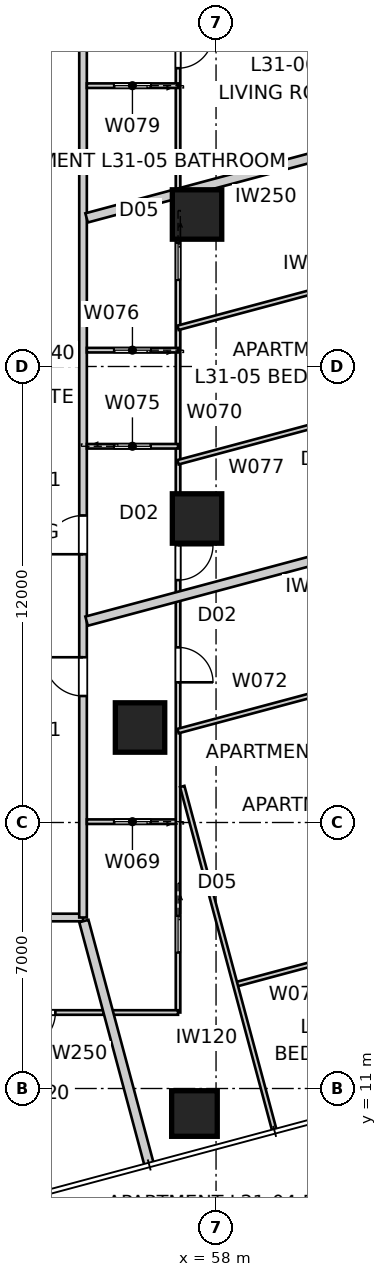
"""IFC4 building model, lengths in metres.
Left out: names, types, materials, properties, quantities, classifications, styles, units other than length and angle.
Written with IfcOpenShell. Run it as: python <this file> out.ifc"""

import sys

from ifc_helpers import new_model, si_unit, direction, frame, frame_2d, origin, origin_2d, place, context, subcontext, project, spatial, rectangle, extrude, element, fill, save


model = new_model("IFC4")
c1 = context("Model", 3, precision=1e-05, world=origin(), true_north=direction((0.0, 1.0)))
c2 = subcontext(c1, "Body", "Model", "MODEL_VIEW")
j1 = project(units=[si_unit("LENGTHUNIT", "METRE"), si_unit("PLANEANGLEUNIT", "RADIAN")], contexts=[c1])
p1 = place(None, origin())
s1 = spatial("IfcSite", under=j1, at=p1, CompositionType="ELEMENT")
p2 = place(p1, origin())
s2 = spatial("IfcBuilding", under=s1, at=p2, CompositionType="ELEMENT")
p3 = place(p2, frame((0.0, 0.0, 115.0)))
s3 = spatial("IfcBuildingStorey", under=s2, at=p3, CompositionType="ELEMENT", Elevation=115.0)
p4 = place(p3, frame((57.432, 10.342, 0.0), z_axis=(0.0, 0.0, 1.0), x_axis=(1.0, 0.0, 0.0)))
e1 = element("IfcColumn", 1, at=p4, inside=s3, PredefinedType="COLUMN", context=c2, shape_type="SweptSolid", body=[
    extrude(rectangle(XDim=1.2, YDim=1.2, at=origin_2d()), origin(), (0.0, 0.0, 1.0), 3.4),
])
for number, where, z_axis, x_axis in (
    (2, (57.5, 26.0, 0.0), (0.0, 0.0, 1.0), (1.0, 0.0, 0.0)),
    (3, (57.5, 34.0, 0.0), (0.0, 0.0, 1.0), (1.0, 0.0, 0.0)),
    (4, (56.0, 20.5, 0.0), (0.0, 0.0, 1.0), (1.0, 0.0, 0.0)),
):
    element("IfcColumn", number, at=place(p3, frame(where, z_axis=z_axis, x_axis=x_axis)), inside=s3, PredefinedType="COLUMN", context=c2, shape_type="SweptSolid", body=[
        extrude(rectangle(XDim=1.3, YDim=1.3, at=origin_2d()), origin(), (0.0, 0.0, 1.0), 3.4),
    ])
p5 = place(p3, frame((26.3, 15.5, 0.0), z_axis=(0.0, 0.0, 1.0), x_axis=(1.0, 0.0, 0.0)))
e5 = element("IfcWall", 5, at=p5, inside=s3, PredefinedType="PARTITIONING", context=c2, shape_type="SweptSolid", body=[
    extrude(rectangle(XDim=28.2, YDim=0.2, at=frame_2d((14.1, 0.0))), origin(), (0.0, 0.0, 1.0), 3.25),
])
p6 = place(p5, frame((21.474, 0.0, 0.0)))
e6 = element("IfcOpeningElement", 6, at=p6, cuts=e5, PredefinedType="OPENING", context=c2, shape_type="SweptSolid", body=[
    extrude(rectangle(XDim=1.02, YDim=2.34, at=frame_2d((0.51, 1.17))), frame((0.0, 0.11, 0.0), z_axis=(0.0, -1.0, 0.0), x_axis=(1.0, 0.0, 0.0)), (0.0, 0.0, 1.0), 0.22),
])
p7 = place(p5, frame((1.353, 0.0, 0.0)))
e7 = element("IfcOpeningElement", 7, at=p7, cuts=e5, PredefinedType="OPENING", context=c2, shape_type="SweptSolid", body=[
    extrude(rectangle(XDim=1.02, YDim=2.1, at=frame_2d((0.51, 1.05))), frame((0.0, 0.11, 0.0), z_axis=(0.0, -1.0, 0.0), x_axis=(1.0, 0.0, 0.0)), (0.0, 0.0, 1.0), 0.22),
])
p8 = place(p3, frame((54.5, 15.5, 0.0), z_axis=(0.0, 0.0, 1.0), x_axis=(0.0, 1.0, 0.0)))
e8 = element("IfcWall", 8, at=p8, inside=s3, PredefinedType="PARTITIONING", context=c2, shape_type="SweptSolid", body=[
    extrude(rectangle(XDim=29.0, YDim=0.2, at=frame_2d((14.5, 0.0))), origin(), (0.0, 0.0, 1.0), 3.25),
])
p9 = place(p8, frame((24.76, 0.0, 0.0)))
e9 = element("IfcOpeningElement", 9, at=p9, cuts=e8, PredefinedType="OPENING", context=c2, shape_type="SweptSolid", body=[
    extrude(rectangle(XDim=1.02, YDim=2.1, at=frame_2d((0.51, 1.05))), frame((0.0, 0.11, 0.0), z_axis=(0.0, -1.0, 0.0), x_axis=(1.0, 0.0, 0.0)), (0.0, 0.0, 1.0), 0.22),
])
p10 = place(p8, frame((5.829, 0.0, 0.0)))
e10 = element("IfcOpeningElement", 10, at=p10, cuts=e8, PredefinedType="OPENING", context=c2, shape_type="SweptSolid", body=[
    extrude(rectangle(XDim=1.02, YDim=2.34, at=frame_2d((0.51, 1.17))), frame((0.0, 0.11, 0.0), z_axis=(0.0, -1.0, 0.0), x_axis=(1.0, 0.0, 0.0)), (0.0, 0.0, 1.0), 0.22),
])
p11 = place(p8, frame((9.559, 0.0, 0.0)))
e11 = element("IfcOpeningElement", 11, at=p11, cuts=e8, PredefinedType="OPENING", context=c2, shape_type="SweptSolid", body=[
    extrude(rectangle(XDim=1.02, YDim=2.34, at=frame_2d((0.51, 1.17))), frame((0.0, 0.11, 0.0), z_axis=(0.0, -1.0, 0.0), x_axis=(1.0, 0.0, 0.0)), (0.0, 0.0, 1.0), 0.22),
])
p12 = place(p3, frame((56.242, 8.988, 0.0), z_axis=(0.0, 0.0, 1.0), x_axis=(-0.25880587229, 0.965929355837, 0.0)))
e12 = element("IfcWall", 12, at=p12, inside=s3, PredefinedType="PARTITIONING", context=c2, shape_type="SweptSolid", body=[
    extrude(rectangle(XDim=6.645, YDim=0.25, at=frame_2d((3.322, 0.0))), origin(), (0.0, 0.0, 1.0), 3.25),
])
p13 = place(p3, frame((63.665, 36.341, 0.0), z_axis=(0.0, 0.0, 1.0), x_axis=(-0.965927049013, -0.258814481793, 0.0)))
e13 = element("IfcWall", 13, at=p13, inside=s3, PredefinedType="PARTITIONING", context=c2, shape_type="SweptSolid", body=[
    extrude(rectangle(XDim=9.392, YDim=0.25, at=frame_2d((4.696, 0.0))), origin(), (0.0, 0.0, 1.0), 3.25),
])
p14 = place(p3, frame((66.318, 26.44, 0.0), z_axis=(0.0, 0.0, 1.0), x_axis=(-0.965924438766, -0.258824223352, 0.0)))
e14 = element("IfcWall", 14, at=p14, inside=s3, PredefinedType="PARTITIONING", context=c2, shape_type="SweptSolid", body=[
    extrude(rectangle(XDim=12.138, YDim=0.25, at=frame_2d((6.069, 0.0))), origin(), (0.0, 0.0, 1.0), 3.25),
])
p15 = place(p3, frame((55.046, 13.0, 0.0), z_axis=(0.0, 0.0, 1.0), x_axis=(-1.0, 0.0, 0.0)))
e15 = element("IfcWall", 15, at=p15, inside=s3, PredefinedType="PARTITIONING", context=c2, shape_type="SweptSolid", body=[
    extrude(rectangle(XDim=23.693, YDim=0.12, at=frame_2d((11.846, 0.0))), origin(), (0.0, 0.0, 1.0), 2.55),
])
p16 = place(p15, frame((8.262, 0.0, 0.0)))
e16 = element("IfcOpeningElement", 16, at=p16, cuts=e15, PredefinedType="OPENING", context=c2, shape_type="SweptSolid", body=[
    extrude(rectangle(XDim=0.92, YDim=2.34, at=frame_2d((0.46, 1.17))), frame((0.0, 0.07, 0.0), z_axis=(0.0, -1.0, 0.0), x_axis=(1.0, 0.0, 0.0)), (0.0, 0.0, 1.0), 0.14),
])
p17 = place(p15, frame((3.825, 0.0, 0.0)))
e17 = element("IfcOpeningElement", 17, at=p17, cuts=e15, PredefinedType="OPENING", context=c2, shape_type="SweptSolid", body=[
    extrude(rectangle(XDim=0.92, YDim=2.34, at=frame_2d((0.46, 1.17))), frame((0.0, 0.07, 0.0), z_axis=(0.0, -1.0, 0.0), x_axis=(1.0, 0.0, 0.0)), (0.0, 0.0, 1.0), 0.14),
])
p18 = place(p15, frame((1.274, 0.0, 0.0)))
e18 = element("IfcOpeningElement", 18, at=p18, cuts=e15, PredefinedType="OPENING", context=c2, shape_type="SweptSolid", body=[
    extrude(rectangle(XDim=0.92, YDim=2.34, at=frame_2d((0.46, 1.17))), frame((0.0, 0.07, 0.0), z_axis=(0.0, -1.0, 0.0), x_axis=(1.0, 0.0, 0.0)), (0.0, 0.0, 1.0), 0.14),
])
p19 = place(p15, frame((13.041, 0.0, 0.0)))
e19 = element("IfcOpeningElement", 19, at=p19, cuts=e15, PredefinedType="OPENING", context=c2, shape_type="SweptSolid", body=[
    extrude(rectangle(XDim=0.96, YDim=2.1, at=frame_2d((0.48, 1.05))), frame((0.0, 0.07, 0.0), z_axis=(0.0, -1.0, 0.0), x_axis=(1.0, 0.0, 0.0)), (0.0, 0.0, 1.0), 0.14),
])
p20 = place(p15, frame((21.917, 0.0, 0.0)))
e20 = element("IfcOpeningElement", 20, at=p20, cuts=e15, PredefinedType="OPENING", context=c2, shape_type="SweptSolid", body=[
    extrude(rectangle(XDim=0.96, YDim=2.1, at=frame_2d((0.48, 1.05))), frame((0.0, 0.07, 0.0), z_axis=(0.0, -1.0, 0.0), x_axis=(1.0, 0.0, 0.0)), (0.0, 0.0, 1.0), 0.14),
])
p21 = place(p3, frame((57.0, 18.021, 0.0), z_axis=(0.0, 0.0, 1.0), x_axis=(-1.0, 0.0, 0.0)))
e21 = element("IfcWall", 21, at=p21, inside=s3, PredefinedType="PARTITIONING", context=c2, shape_type="SweptSolid", body=[
    extrude(rectangle(XDim=2.4, YDim=0.12, at=frame_2d((1.2, 0.0))), origin(), (0.0, 0.0, 1.0), 3.25),
])
p22 = place(p21, frame((0.72, 0.0, 0.0)))
e22 = element("IfcOpeningElement", 22, at=p22, cuts=e21, PredefinedType="OPENING", context=c2, shape_type="SweptSolid", body=[
    extrude(rectangle(XDim=0.96, YDim=2.1, at=frame_2d((0.48, 1.05))), frame((0.0, 0.07, 0.0), z_axis=(0.0, -1.0, 0.0), x_axis=(1.0, 0.0, 0.0)), (0.0, 0.0, 1.0), 0.14),
])
p23 = place(p3, frame((57.0, 47.0, 0.0), z_axis=(0.0, 0.0, 1.0), x_axis=(0.0, -1.0, 0.0)))
e23 = element("IfcWall", 23, at=p23, inside=s3, PredefinedType="PARTITIONING", context=c2, shape_type="SweptSolid", body=[
    extrude(rectangle(XDim=34.0, YDim=0.12, at=frame_2d((17.0, 0.0))), origin(), (0.0, 0.0, 1.0), 2.55),
])
p24 = place(p23, frame((8.23, 0.0, 0.0)))
e24 = element("IfcOpeningElement", 24, at=p24, cuts=e23, PredefinedType="OPENING", context=c2, shape_type="SweptSolid", body=[
    extrude(rectangle(XDim=0.92, YDim=2.34, at=frame_2d((0.46, 1.17))), frame((0.0, 0.07, 0.0), z_axis=(0.0, -1.0, 0.0), x_axis=(1.0, 0.0, 0.0)), (0.0, 0.0, 1.0), 0.14),
])
p25 = place(p23, frame((3.192, 0.0, 0.0)))
e25 = element("IfcOpeningElement", 25, at=p25, cuts=e23, PredefinedType="OPENING", context=c2, shape_type="SweptSolid", body=[
    extrude(rectangle(XDim=0.92, YDim=2.34, at=frame_2d((0.46, 1.17))), frame((0.0, 0.07, 0.0), z_axis=(0.0, -1.0, 0.0), x_axis=(1.0, 0.0, 0.0)), (0.0, 0.0, 1.0), 0.14),
])
p26 = place(p23, frame((24.391, 0.0, 0.0)))
e26 = element("IfcOpeningElement", 26, at=p26, cuts=e23, PredefinedType="OPENING", context=c2, shape_type="SweptSolid", body=[
    extrude(rectangle(XDim=0.92, YDim=2.34, at=frame_2d((0.46, 1.17))), frame((0.0, 0.07, 0.0), z_axis=(0.0, -1.0, 0.0), x_axis=(1.0, 0.0, 0.0)), (0.0, 0.0, 1.0), 0.14),
])
p27 = place(p23, frame((21.702, 0.0, 0.0)))
e27 = element("IfcOpeningElement", 27, at=p27, cuts=e23, PredefinedType="OPENING", context=c2, shape_type="SweptSolid", body=[
    extrude(rectangle(XDim=0.92, YDim=2.34, at=frame_2d((0.46, 1.17))), frame((0.0, 0.07, 0.0), z_axis=(0.0, -1.0, 0.0), x_axis=(1.0, 0.0, 0.0)), (0.0, 0.0, 1.0), 0.14),
])
p28 = place(p23, frame((31.459, 0.0, 0.0)))
e28 = element("IfcOpeningElement", 28, at=p28, cuts=e23, PredefinedType="OPENING", context=c2, shape_type="SweptSolid", body=[
    extrude(rectangle(XDim=0.96, YDim=2.1, at=frame_2d((0.48, 1.05))), frame((0.0, 0.07, 0.0), z_axis=(0.0, -1.0, 0.0), x_axis=(1.0, 0.0, 0.0)), (0.0, 0.0, 1.0), 0.14),
])
p29 = place(p23, frame((13.759, 0.0, 0.0)))
e29 = element("IfcOpeningElement", 29, at=p29, cuts=e23, PredefinedType="OPENING", context=c2, shape_type="SweptSolid", body=[
    extrude(rectangle(XDim=0.96, YDim=2.1, at=frame_2d((0.48, 1.05))), frame((0.0, 0.07, 0.0), z_axis=(0.0, -1.0, 0.0), x_axis=(1.0, 0.0, 0.0)), (0.0, 0.0, 1.0), 0.14),
])
p30 = place(p3, frame((57.0, 13.0, 0.0), z_axis=(0.0, 0.0, 1.0), x_axis=(-1.0, 0.0, 0.0)))
e30 = element("IfcWall", 30, at=p30, inside=s3, PredefinedType="PARTITIONING", context=c2, shape_type="SweptSolid", body=[
    extrude(rectangle(XDim=1.833, YDim=0.12, at=frame_2d((0.917, 0.0))), origin(), (0.0, 0.0, 1.0), 3.25),
])
p31 = place(p3, frame((57.0, 20.406, 0.0), z_axis=(0.0, 0.0, 1.0), x_axis=(0.9659257847, 0.258819200315, 0.0)))
e31 = element("IfcWall", 31, at=p31, inside=s3, PredefinedType="PARTITIONING", context=c2, shape_type="SweptSolid", body=[
    extrude(rectangle(XDim=10.522, YDim=0.12, at=frame_2d((5.261, 0.0))), origin(), (0.0, 0.0, 1.0), 2.722),
])
p32 = place(p31, frame((4.821, 0.0, 0.0)))
e32 = element("IfcOpeningElement", 32, at=p32, cuts=e31, PredefinedType="OPENING", context=c2, shape_type="SweptSolid", body=[
    extrude(rectangle(XDim=0.92, YDim=2.34, at=frame_2d((0.46, 1.17))), frame((0.0, 0.07, 0.0), z_axis=(0.0, -1.0, 0.0), x_axis=(1.0, 0.0, 0.0)), (0.0, 0.0, 1.0), 0.14),
])
p33 = place(p3, frame((65.069, 15.494, 0.0), z_axis=(0.0, 0.0, 1.0), x_axis=(-0.965922865286, -0.258830095464, 0.0)))
e33 = element("IfcWall", 33, at=p33, inside=s3, PredefinedType="PARTITIONING", context=c2, shape_type="SweptSolid", body=[
    extrude(rectangle(XDim=6.793, YDim=0.12, at=frame_2d((3.396, 0.0))), origin(), (0.0, 0.0, 1.0), 3.25),
])
p34 = place(p33, frame((2.892, 0.0, 0.0)))
e34 = element("IfcOpeningElement", 34, at=p34, cuts=e33, PredefinedType="OPENING", context=c2, shape_type="SweptSolid", body=[
    extrude(rectangle(XDim=0.92, YDim=2.34, at=frame_2d((0.46, 1.17))), frame((0.0, 0.07, 0.0), z_axis=(0.0, -1.0, 0.0), x_axis=(1.0, 0.0, 0.0)), (0.0, 0.0, 1.0), 0.14),
])
p35 = place(p3, frame((59.532, 9.911, 0.0), z_axis=(0.0, 0.0, 1.0), x_axis=(-0.25881390457, 0.965927203676, 0.0)))
e35 = element("IfcWall", 35, at=p35, inside=s3, PredefinedType="PARTITIONING", context=c2, shape_type="SweptSolid", body=[
    extrude(rectangle(XDim=9.357, YDim=0.12, at=frame_2d((4.678, 0.0))), origin(), (0.0, 0.0, 1.0), 2.638),
])
p36 = place(p3, frame((54.6, 27.901, 0.0), z_axis=(0.0, 0.0, 1.0), x_axis=(1.0, 0.0, 0.0)))
e36 = element("IfcWall", 36, at=p36, inside=s3, PredefinedType="PARTITIONING", context=c2, shape_type="SweptSolid", body=[
    extrude(rectangle(XDim=2.4, YDim=0.12, at=frame_2d((1.2, 0.0))), origin(), (0.0, 0.0, 1.0), 3.25),
])
p37 = place(p36, frame((0.72, 0.0, 0.0)))
e37 = element("IfcOpeningElement", 37, at=p37, cuts=e36, PredefinedType="OPENING", context=c2, shape_type="SweptSolid", body=[
    extrude(rectangle(XDim=0.96, YDim=2.1, at=frame_2d((0.48, 1.05))), frame((0.0, 0.07, 0.0), z_axis=(0.0, -1.0, 0.0), x_axis=(1.0, 0.0, 0.0)), (0.0, 0.0, 1.0), 0.14),
])
p38 = place(p3, frame((57.0, 30.43, 0.0), z_axis=(0.0, 0.0, 1.0), x_axis=(-1.0, 0.0, 0.0)))
e38 = element("IfcWall", 38, at=p38, inside=s3, PredefinedType="PARTITIONING", context=c2, shape_type="SweptSolid", body=[
    extrude(rectangle(XDim=2.4, YDim=0.12, at=frame_2d((1.2, 0.0))), origin(), (0.0, 0.0, 1.0), 3.25),
])
p39 = place(p38, frame((0.72, 0.0, 0.0)))
e39 = element("IfcOpeningElement", 39, at=p39, cuts=e38, PredefinedType="OPENING", context=c2, shape_type="SweptSolid", body=[
    extrude(rectangle(XDim=0.96, YDim=2.1, at=frame_2d((0.48, 1.05))), frame((0.0, 0.07, 0.0), z_axis=(0.0, -1.0, 0.0), x_axis=(1.0, 0.0, 0.0)), (0.0, 0.0, 1.0), 0.14),
])
p40 = place(p3, frame((57.0, 27.481, 0.0), z_axis=(0.0, 0.0, 1.0), x_axis=(0.965925607751, 0.258819860698, 0.0)))
e40 = element("IfcWall", 40, at=p40, inside=s3, PredefinedType="PARTITIONING", context=c2, shape_type="SweptSolid", body=[
    extrude(rectangle(XDim=8.691, YDim=0.12, at=frame_2d((4.346, 0.0))), origin(), (0.0, 0.0, 1.0), 3.25),
])
p41 = place(p40, frame((3.906, 0.0, 0.0)))
e41 = element("IfcOpeningElement", 41, at=p41, cuts=e40, PredefinedType="OPENING", context=c2, shape_type="SweptSolid", body=[
    extrude(rectangle(XDim=0.92, YDim=2.34, at=frame_2d((0.46, 1.17))), frame((0.0, 0.07, 0.0), z_axis=(0.0, -1.0, 0.0), x_axis=(1.0, 0.0, 0.0)), (0.0, 0.0, 1.0), 0.14),
])
p42 = place(p3, frame((57.0, 31.018, 0.0), z_axis=(0.0, 0.0, 1.0), x_axis=(0.965927309482, 0.258813509689, 0.0)))
e42 = element("IfcWall", 42, at=p42, inside=s3, PredefinedType="PARTITIONING", context=c2, shape_type="SweptSolid", body=[
    extrude(rectangle(XDim=7.776, YDim=0.12, at=frame_2d((3.888, 0.0))), origin(), (0.0, 0.0, 1.0), 3.25),
])
p43 = place(p3, frame((57.0, 37.39, 0.0), z_axis=(0.0, 0.0, 1.0), x_axis=(-1.0, 0.0, 0.0)))
e43 = element("IfcWall", 43, at=p43, inside=s3, PredefinedType="PARTITIONING", context=c2, shape_type="SweptSolid", body=[
    extrude(rectangle(XDim=2.4, YDim=0.12, at=frame_2d((1.2, 0.0))), origin(), (0.0, 0.0, 1.0), 3.25),
])
p44 = place(p43, frame((0.72, 0.0, 0.0)))
e44 = element("IfcOpeningElement", 44, at=p44, cuts=e43, PredefinedType="OPENING", context=c2, shape_type="SweptSolid", body=[
    extrude(rectangle(XDim=0.96, YDim=2.1, at=frame_2d((0.48, 1.05))), frame((0.0, 0.07, 0.0), z_axis=(0.0, -1.0, 0.0), x_axis=(1.0, 0.0, 0.0)), (0.0, 0.0, 1.0), 0.14),
])
p45 = place(p10, origin())
e45 = element("IfcDoor", 45, at=p45, inside=s3, OperationType="SINGLE_SWING_RIGHT", PredefinedType="DOOR", context=c2, shape_type="SweptSolid", body=[
    extrude(rectangle(XDim=1.02, YDim=2.34, at=frame_2d((0.51, 1.17))), frame((0.0, 0.025, 0.0), z_axis=(0.0, -1.0, 0.0), x_axis=(1.0, 0.0, 0.0)), (0.0, 0.0, 1.0), 0.05),
])
fill(e10, e45)
p46 = place(p11, origin())
e46 = element("IfcDoor", 46, at=p46, inside=s3, OperationType="SINGLE_SWING_LEFT", PredefinedType="DOOR", context=c2, shape_type="SweptSolid", body=[
    extrude(rectangle(XDim=1.02, YDim=2.34, at=frame_2d((0.51, 1.17))), frame((0.0, 0.025, 0.0), z_axis=(0.0, -1.0, 0.0), x_axis=(1.0, 0.0, 0.0)), (0.0, 0.0, 1.0), 0.05),
])
fill(e11, e46)
p47 = place(p18, origin())
e47 = element("IfcDoor", 47, at=p47, inside=s3, OperationType="SINGLE_SWING_RIGHT", PredefinedType="DOOR", context=c2, shape_type="SweptSolid", body=[
    extrude(rectangle(XDim=0.92, YDim=2.34, at=frame_2d((0.46, 1.17))), frame((0.0, 0.025, 0.0), z_axis=(0.0, -1.0, 0.0), x_axis=(1.0, 0.0, 0.0)), (0.0, 0.0, 1.0), 0.05),
])
fill(e18, e47)
p48 = place(p24, origin())
e48 = element("IfcDoor", 48, at=p48, inside=s3, OperationType="SINGLE_SWING_LEFT", PredefinedType="DOOR", context=c2, shape_type="SweptSolid", body=[
    extrude(rectangle(XDim=0.92, YDim=2.34, at=frame_2d((0.46, 1.17))), frame((0.0, 0.025, 0.0), z_axis=(0.0, -1.0, 0.0), x_axis=(1.0, 0.0, 0.0)), (0.0, 0.0, 1.0), 0.05),
])
fill(e24, e48)
p49 = place(p44, origin())
e49 = element("IfcDoor", 49, at=p49, inside=s3, OperationType="SLIDING_TO_LEFT", PredefinedType="DOOR", context=c2, shape_type="SweptSolid", body=[
    extrude(rectangle(XDim=0.96, YDim=2.1, at=frame_2d((0.48, 1.05))), frame((0.0, 0.025, 0.0), z_axis=(0.0, -1.0, 0.0), x_axis=(1.0, 0.0, 0.0)), (0.0, 0.0, 1.0), 0.05),
])
fill(e44, e49)
p50 = place(p26, origin())
e50 = element("IfcDoor", 50, at=p50, inside=s3, OperationType="SINGLE_SWING_RIGHT", PredefinedType="DOOR", context=c2, shape_type="SweptSolid", body=[
    extrude(rectangle(XDim=0.92, YDim=2.34, at=frame_2d((0.46, 1.17))), frame((0.0, 0.025, 0.0), z_axis=(0.0, -1.0, 0.0), x_axis=(1.0, 0.0, 0.0)), (0.0, 0.0, 1.0), 0.05),
])
fill(e26, e50)
p51 = place(p22, origin())
e51 = element("IfcDoor", 51, at=p51, inside=s3, OperationType="SLIDING_TO_LEFT", PredefinedType="DOOR", context=c2, shape_type="SweptSolid", body=[
    extrude(rectangle(XDim=0.96, YDim=2.1, at=frame_2d((0.48, 1.05))), frame((0.0, 0.025, 0.0), z_axis=(0.0, -1.0, 0.0), x_axis=(1.0, 0.0, 0.0)), (0.0, 0.0, 1.0), 0.05),
])
fill(e22, e51)
p52 = place(p27, origin())
e52 = element("IfcDoor", 52, at=p52, inside=s3, OperationType="SINGLE_SWING_LEFT", PredefinedType="DOOR", context=c2, shape_type="SweptSolid", body=[
    extrude(rectangle(XDim=0.92, YDim=2.34, at=frame_2d((0.46, 1.17))), frame((0.0, 0.025, 0.0), z_axis=(0.0, -1.0, 0.0), x_axis=(1.0, 0.0, 0.0)), (0.0, 0.0, 1.0), 0.05),
])
fill(e27, e52)
p53 = place(p37, origin())
e53 = element("IfcDoor", 53, at=p53, inside=s3, OperationType="SLIDING_TO_LEFT", PredefinedType="DOOR", context=c2, shape_type="SweptSolid", body=[
    extrude(rectangle(XDim=0.96, YDim=2.1, at=frame_2d((0.48, 1.05))), frame((0.0, 0.025, 0.0), z_axis=(0.0, -1.0, 0.0), x_axis=(1.0, 0.0, 0.0)), (0.0, 0.0, 1.0), 0.05),
])
fill(e37, e53)
p54 = place(p28, origin())
e54 = element("IfcDoor", 54, at=p54, inside=s3, OperationType="SLIDING_TO_LEFT", PredefinedType="DOOR", context=c2, shape_type="SweptSolid", body=[
    extrude(rectangle(XDim=0.96, YDim=2.1, at=frame_2d((0.48, 1.05))), frame((0.0, 0.025, 0.0), z_axis=(0.0, -1.0, 0.0), x_axis=(1.0, 0.0, 0.0)), (0.0, 0.0, 1.0), 0.05),
])
fill(e28, e54)
p55 = place(p39, origin())
e55 = element("IfcDoor", 55, at=p55, inside=s3, OperationType="SLIDING_TO_LEFT", PredefinedType="DOOR", context=c2, shape_type="SweptSolid", body=[
    extrude(rectangle(XDim=0.96, YDim=2.1, at=frame_2d((0.48, 1.05))), frame((0.0, 0.025, 0.0), z_axis=(0.0, -1.0, 0.0), x_axis=(1.0, 0.0, 0.0)), (0.0, 0.0, 1.0), 0.05),
])
fill(e39, e55)
p56 = place(p29, origin())
e56 = element("IfcDoor", 56, at=p56, inside=s3, OperationType="SLIDING_TO_LEFT", PredefinedType="DOOR", context=c2, shape_type="SweptSolid", body=[
    extrude(rectangle(XDim=0.96, YDim=2.1, at=frame_2d((0.48, 1.05))), frame((0.0, 0.025, 0.0), z_axis=(0.0, -1.0, 0.0), x_axis=(1.0, 0.0, 0.0)), (0.0, 0.0, 1.0), 0.05),
])
fill(e29, e56)
save(model, sys.argv[1])
